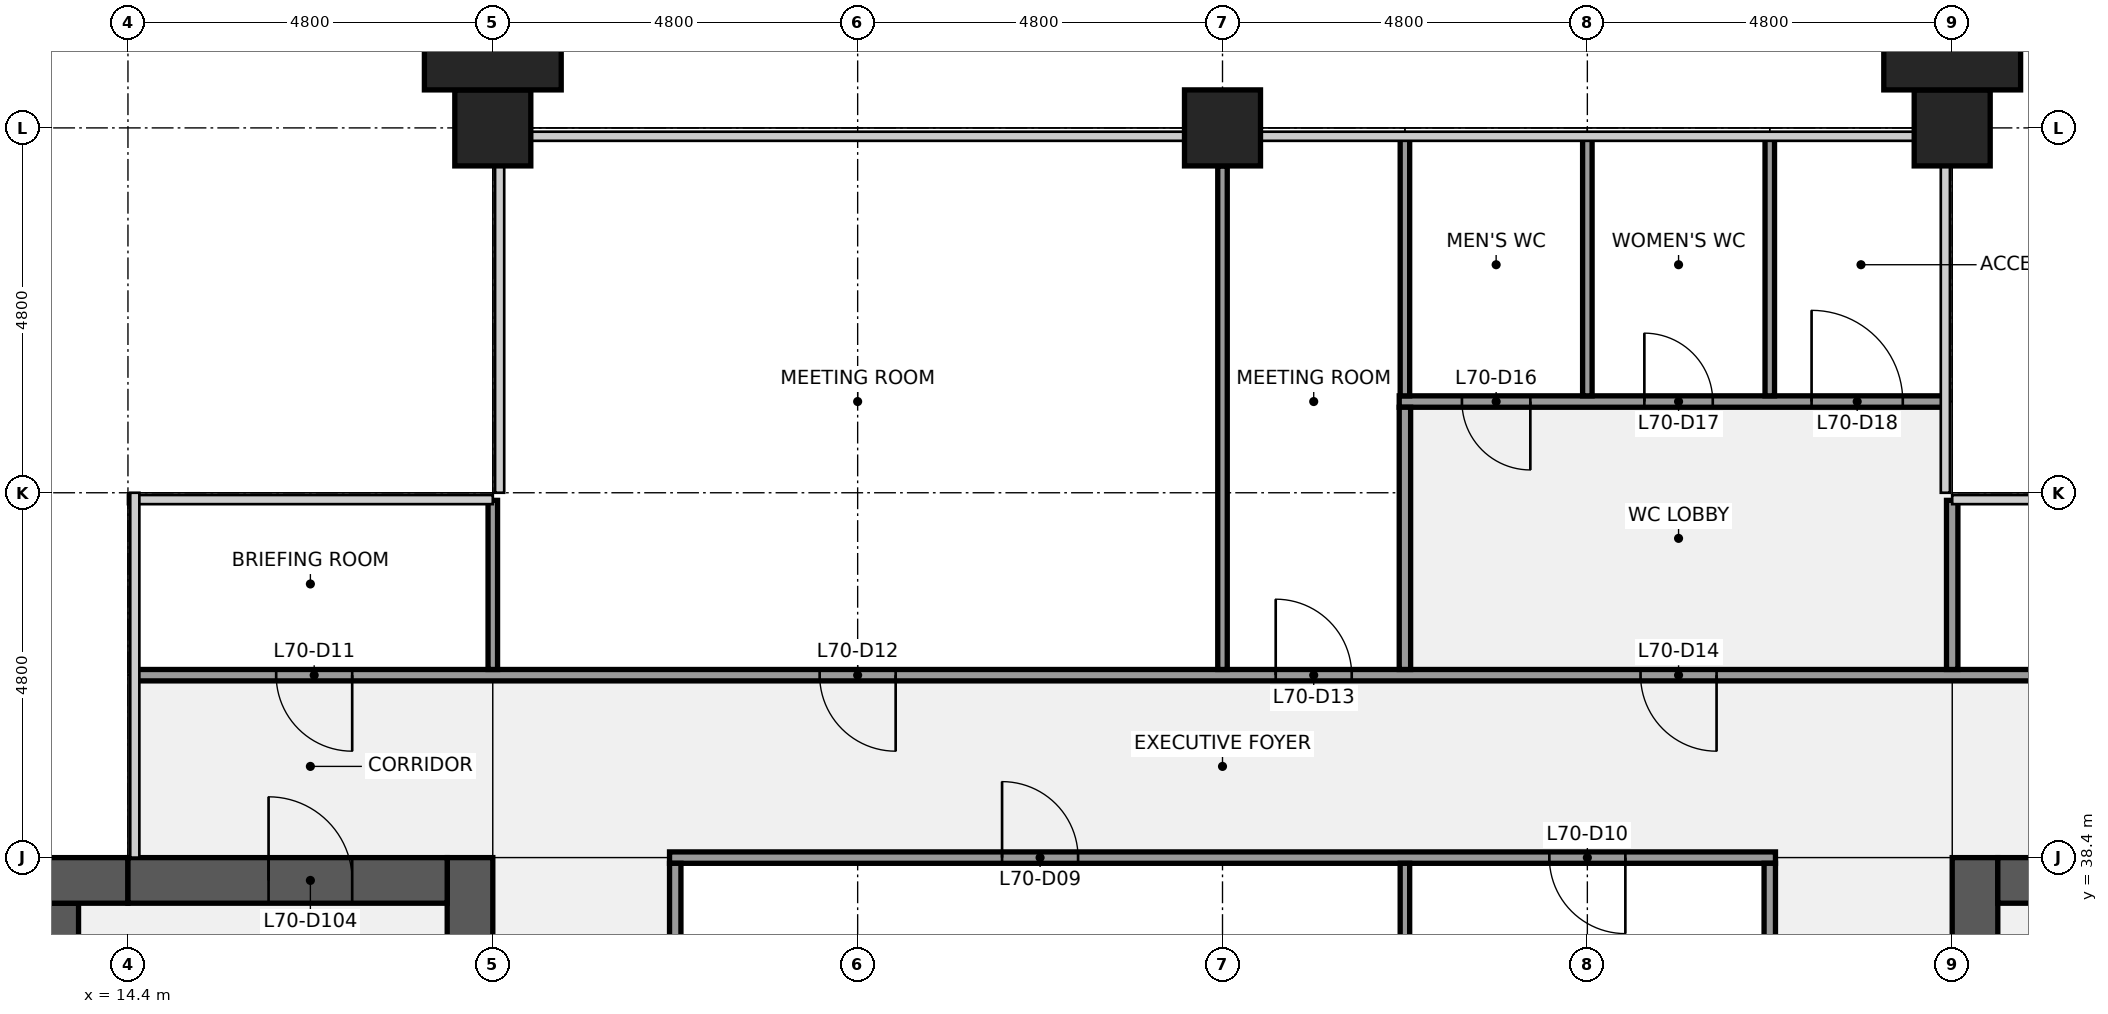
"""IFC4 building model, lengths in metres.
Left out: names, types, materials, properties, quantities, classifications, styles, units other than length and angle.
Written with IfcOpenShell. Run it as: python <this file> out.ifc"""

import sys

from ifc_helpers import new_model, si_unit, direction, frame, frame_2d, origin, origin_2d, place, context, subcontext, project, spatial, rectangle, extrude, element, fill, save


model = new_model("IFC4")
c1 = context("Model", 3, precision=1e-05, world=origin(), true_north=direction((0.0, 1.0)))
c2 = subcontext(c1, "Body", "Model", "MODEL_VIEW")
j1 = project(units=[si_unit("LENGTHUNIT", "METRE"), si_unit("PLANEANGLEUNIT", "RADIAN")], contexts=[c1])
p1 = place(None, origin())
s1 = spatial("IfcSite", under=j1, at=p1, CompositionType="ELEMENT")
p2 = place(p1, origin())
s2 = spatial("IfcBuilding", under=s1, at=p2, CompositionType="ELEMENT")
p3 = place(p2, frame((0.0, 0.0, 318.3)))
s3 = spatial("IfcBuildingStorey", under=s2, at=p3, CompositionType="ELEMENT", Elevation=318.3)
for number, where, z_axis, x_axis in (
    (1, (19.2, 48.0, 0.0), (0.0, 0.0, 1.0), (1.0, 0.0, 0.0)),
    (2, (28.8, 48.0, 0.0), (0.0, 0.0, 1.0), (1.0, 0.0, 0.0)),
    (3, (38.4, 48.0, 0.0), (0.0, 0.0, 1.0), (1.0, 0.0, 0.0)),
):
    element("IfcColumn", number, at=place(p3, frame(where, z_axis=z_axis, x_axis=x_axis)), inside=s3, PredefinedType="COLUMN", context=c2, shape_type="SweptSolid", body=[
        extrude(rectangle(XDim=1.0, YDim=1.0, at=origin_2d()), origin(), (0.0, 0.0, 1.0), 4.0),
    ])
p4 = place(p3, frame((18.9, 38.4, 0.0), z_axis=(0.0, 0.0, 1.0), x_axis=(0.0, -1.0, 0.0)))
e4 = element("IfcWall", 4, at=p4, inside=s3, PredefinedType="SHEAR", context=c2, shape_type="SweptSolid", body=[
    extrude(rectangle(XDim=28.8, YDim=0.6, at=frame_2d((14.4, 0.0))), origin(), (0.0, 0.0, 1.0), 3.84),
])
p5 = place(p4, frame((18.3, 0.0, 0.0)))
e5 = element("IfcOpeningElement", 5, at=p5, cuts=e4, PredefinedType="OPENING", context=c2, shape_type="SweptSolid", body=[
    extrude(rectangle(XDim=1.8, YDim=2.1, at=frame_2d((0.9, 1.05))), frame((0.0, 0.31, 0.0), z_axis=(0.0, -1.0, 0.0), x_axis=(1.0, 0.0, 0.0)), (0.0, 0.0, 1.0), 0.62),
])
p6 = place(p4, frame((8.7, 0.0, 0.0)))
e6 = element("IfcOpeningElement", 6, at=p6, cuts=e4, PredefinedType="OPENING", context=c2, shape_type="SweptSolid", body=[
    extrude(rectangle(XDim=1.8, YDim=2.1, at=frame_2d((0.9, 1.05))), frame((0.0, 0.31, 0.0), z_axis=(0.0, -1.0, 0.0), x_axis=(1.0, 0.0, 0.0)), (0.0, 0.0, 1.0), 0.62),
])
p7 = place(p3, frame((6.25, 37.5, 0.0), z_axis=(0.0, 0.0, 1.0), x_axis=(1.0, 0.0, 0.0)))
e7 = element("IfcWall", 7, at=p7, inside=s3, PredefinedType="SHEAR", context=c2, shape_type="SweptSolid", body=[
    extrude(rectangle(XDim=7.5, YDim=0.6, at=frame_2d((3.75, 0.0))), origin(), (0.0, 0.0, 1.0), 3.84),
])
p8 = place(p3, frame((0.6, 38.1, 0.0), z_axis=(0.0, 0.0, 1.0), x_axis=(1.0, 0.0, 0.0)))
e8 = element("IfcWall", 8, at=p8, inside=s3, PredefinedType="SHEAR", context=c2, shape_type="SweptSolid", body=[
    extrude(rectangle(XDim=13.8, YDim=0.6, at=frame_2d((6.9, 0.0))), origin(), (0.0, 0.0, 1.0), 3.84),
])
p9 = place(p8, frame((5.7, 0.0, 0.9)))
e9 = element("IfcOpeningElement", 9, at=p9, cuts=e8, PredefinedType="OPENING", context=c2, shape_type="SweptSolid", body=[
    extrude(rectangle(XDim=1.8, YDim=1.5, at=frame_2d((0.9, 0.75))), frame((0.0, 0.31, 0.0), z_axis=(0.0, -1.0, 0.0), x_axis=(1.0, 0.0, 0.0)), (0.0, 0.0, 1.0), 0.62),
])
p10 = place(p8, frame((10.5, 0.0, 0.9)))
e10 = element("IfcOpeningElement", 10, at=p10, cuts=e8, PredefinedType="OPENING", context=c2, shape_type="SweptSolid", body=[
    extrude(rectangle(XDim=1.8, YDim=1.5, at=frame_2d((0.9, 0.75))), frame((0.0, 0.31, 0.0), z_axis=(0.0, -1.0, 0.0), x_axis=(1.0, 0.0, 0.0)), (0.0, 0.0, 1.0), 0.62),
])
p11 = place(p3, frame((14.4, 38.1, 0.0), z_axis=(0.0, 0.0, 1.0), x_axis=(1.0, 0.0, 0.0)))
e11 = element("IfcWall", 11, at=p11, inside=s3, PredefinedType="SHEAR", context=c2, shape_type="SweptSolid", body=[
    extrude(rectangle(XDim=4.2, YDim=0.6, at=frame_2d((2.1, 0.0))), origin(), (0.0, 0.0, 1.0), 3.84),
])
p12 = place(p11, frame((1.85, 0.0, 0.0)))
e12 = element("IfcOpeningElement", 12, at=p12, cuts=e11, PredefinedType="OPENING", context=c2, shape_type="SweptSolid", body=[
    extrude(rectangle(XDim=1.1, YDim=2.1, at=frame_2d((0.55, 1.05))), frame((0.0, 0.31, 0.0), z_axis=(0.0, -1.0, 0.0), x_axis=(1.0, 0.0, 0.0)), (0.0, 0.0, 1.0), 0.62),
])
p13 = place(p3, frame((38.7, 9.6, 0.0), z_axis=(0.0, 0.0, 1.0), x_axis=(0.0, 1.0, 0.0)))
e13 = element("IfcWall", 13, at=p13, inside=s3, PredefinedType="SHEAR", context=c2, shape_type="SweptSolid", body=[
    extrude(rectangle(XDim=28.8, YDim=0.6, at=frame_2d((14.4, 0.0))), origin(), (0.0, 0.0, 1.0), 3.84),
])
p14 = place(p13, frame((8.7, 0.0, 0.0)))
e14 = element("IfcOpeningElement", 14, at=p14, cuts=e13, PredefinedType="OPENING", context=c2, shape_type="SweptSolid", body=[
    extrude(rectangle(XDim=1.8, YDim=2.1, at=frame_2d((0.9, 1.05))), frame((0.0, 0.31, 0.0), z_axis=(0.0, -1.0, 0.0), x_axis=(1.0, 0.0, 0.0)), (0.0, 0.0, 1.0), 0.62),
])
p15 = place(p13, frame((18.3, 0.0, 0.0)))
e15 = element("IfcOpeningElement", 15, at=p15, cuts=e13, PredefinedType="OPENING", context=c2, shape_type="SweptSolid", body=[
    extrude(rectangle(XDim=1.8, YDim=2.1, at=frame_2d((0.9, 1.05))), frame((0.0, 0.31, 0.0), z_axis=(0.0, -1.0, 0.0), x_axis=(1.0, 0.0, 0.0)), (0.0, 0.0, 1.0), 0.62),
])
p16 = place(p3, frame((39.0, 38.1, 0.0), z_axis=(0.0, 0.0, 1.0), x_axis=(1.0, 0.0, 0.0)))
e16 = element("IfcWall", 16, at=p16, inside=s3, PredefinedType="SHEAR", context=c2, shape_type="SweptSolid", body=[
    extrude(rectangle(XDim=4.2, YDim=0.6, at=frame_2d((2.1, 0.0))), origin(), (0.0, 0.0, 1.0), 3.84),
])
p17 = place(p16, frame((1.25, 0.0, 0.0)))
e17 = element("IfcOpeningElement", 17, at=p17, cuts=e16, PredefinedType="OPENING", context=c2, shape_type="SweptSolid", body=[
    extrude(rectangle(XDim=1.1, YDim=2.1, at=frame_2d((0.55, 1.05))), frame((0.0, 0.31, 0.0), z_axis=(0.0, -1.0, 0.0), x_axis=(1.0, 0.0, 0.0)), (0.0, 0.0, 1.0), 0.62),
])
p18 = place(p3, frame((21.525, 38.4, 0.0), z_axis=(0.0, 0.0, 1.0), x_axis=(1.0, 0.0, 0.0)))
e18 = element("IfcWall", 18, at=p18, inside=s3, PredefinedType="PARTITIONING", context=c2, shape_type="SweptSolid", body=[
    extrude(rectangle(XDim=14.55, YDim=0.15, at=frame_2d((7.275, 0.0))), origin(), (0.0, 0.0, 1.0), 2.87),
])
p19 = place(p18, frame((4.375, 0.0, 0.0)))
e19 = element("IfcOpeningElement", 19, at=p19, cuts=e18, PredefinedType="OPENING", context=c2, shape_type="SweptSolid", body=[
    extrude(rectangle(XDim=1.0, YDim=2.1, at=frame_2d((0.5, 1.05))), frame((0.0, 0.085, 0.0), z_axis=(0.0, -1.0, 0.0), x_axis=(1.0, 0.0, 0.0)), (0.0, 0.0, 1.0), 0.17),
])
p20 = place(p18, frame((11.575, 0.0, 0.0)))
e20 = element("IfcOpeningElement", 20, at=p20, cuts=e18, PredefinedType="OPENING", context=c2, shape_type="SweptSolid", body=[
    extrude(rectangle(XDim=1.0, YDim=2.1, at=frame_2d((0.5, 1.05))), frame((0.0, 0.085, 0.0), z_axis=(0.0, -1.0, 0.0), x_axis=(1.0, 0.0, 0.0)), (0.0, 0.0, 1.0), 0.17),
])
p21 = place(p3, frame((14.5, 40.8, 0.0), z_axis=(0.0, 0.0, 1.0), x_axis=(1.0, 0.0, 0.0)))
e21 = element("IfcWall", 21, at=p21, inside=s3, PredefinedType="PARTITIONING", context=c2, shape_type="SweptSolid", body=[
    extrude(rectangle(XDim=28.6, YDim=0.15, at=frame_2d((14.3, 0.0))), origin(), (0.0, 0.0, 1.0), 2.87),
])
p22 = place(p21, frame((1.85, 0.0, 0.0)))
e22 = element("IfcOpeningElement", 22, at=p22, cuts=e21, PredefinedType="OPENING", context=c2, shape_type="SweptSolid", body=[
    extrude(rectangle(XDim=1.0, YDim=2.1, at=frame_2d((0.5, 1.05))), frame((0.0, 0.085, 0.0), z_axis=(0.0, -1.0, 0.0), x_axis=(1.0, 0.0, 0.0)), (0.0, 0.0, 1.0), 0.17),
])
p23 = place(p21, frame((9.0, 0.0, 0.0)))
e23 = element("IfcOpeningElement", 23, at=p23, cuts=e21, PredefinedType="OPENING", context=c2, shape_type="SweptSolid", body=[
    extrude(rectangle(XDim=1.0, YDim=2.1, at=frame_2d((0.5, 1.05))), frame((0.0, 0.085, 0.0), z_axis=(0.0, -1.0, 0.0), x_axis=(1.0, 0.0, 0.0)), (0.0, 0.0, 1.0), 0.17),
])
p24 = place(p21, frame((15.0, 0.0, 0.0)))
e24 = element("IfcOpeningElement", 24, at=p24, cuts=e21, PredefinedType="OPENING", context=c2, shape_type="SweptSolid", body=[
    extrude(rectangle(XDim=1.0, YDim=2.1, at=frame_2d((0.5, 1.05))), frame((0.0, 0.085, 0.0), z_axis=(0.0, -1.0, 0.0), x_axis=(1.0, 0.0, 0.0)), (0.0, 0.0, 1.0), 0.17),
])
p25 = place(p21, frame((19.8, 0.0, 0.0)))
e25 = element("IfcOpeningElement", 25, at=p25, cuts=e21, PredefinedType="OPENING", context=c2, shape_type="SweptSolid", body=[
    extrude(rectangle(XDim=1.0, YDim=2.1, at=frame_2d((0.5, 1.05))), frame((0.0, 0.085, 0.0), z_axis=(0.0, -1.0, 0.0), x_axis=(1.0, 0.0, 0.0)), (0.0, 0.0, 1.0), 0.17),
])
p26 = place(p21, frame((25.75, 0.0, 0.0)))
e26 = element("IfcOpeningElement", 26, at=p26, cuts=e21, PredefinedType="OPENING", context=c2, shape_type="SweptSolid", body=[
    extrude(rectangle(XDim=1.0, YDim=2.1, at=frame_2d((0.5, 1.05))), frame((0.0, 0.085, 0.0), z_axis=(0.0, -1.0, 0.0), x_axis=(1.0, 0.0, 0.0)), (0.0, 0.0, 1.0), 0.17),
])
p27 = place(p3, frame((31.125, 44.4, 0.0), z_axis=(0.0, 0.0, 1.0), x_axis=(1.0, 0.0, 0.0)))
e27 = element("IfcWall", 27, at=p27, inside=s3, PredefinedType="PARTITIONING", context=c2, shape_type="SweptSolid", body=[
    extrude(rectangle(XDim=7.175, YDim=0.15, at=frame_2d((3.587, 0.0))), origin(), (0.0, 0.0, 1.0), 2.87),
])
p28 = place(p27, frame((0.825, 0.0, 0.0)))
e28 = element("IfcOpeningElement", 28, at=p28, cuts=e27, PredefinedType="OPENING", context=c2, shape_type="SweptSolid", body=[
    extrude(rectangle(XDim=0.9, YDim=2.1, at=frame_2d((0.45, 1.05))), frame((0.0, 0.085, 0.0), z_axis=(0.0, -1.0, 0.0), x_axis=(1.0, 0.0, 0.0)), (0.0, 0.0, 1.0), 0.17),
])
p29 = place(p27, frame((3.225, 0.0, 0.0)))
e29 = element("IfcOpeningElement", 29, at=p29, cuts=e27, PredefinedType="OPENING", context=c2, shape_type="SweptSolid", body=[
    extrude(rectangle(XDim=0.9, YDim=2.1, at=frame_2d((0.45, 1.05))), frame((0.0, 0.085, 0.0), z_axis=(0.0, -1.0, 0.0), x_axis=(1.0, 0.0, 0.0)), (0.0, 0.0, 1.0), 0.17),
])
p30 = place(p27, frame((5.425, 0.0, 0.0)))
e30 = element("IfcOpeningElement", 30, at=p30, cuts=e27, PredefinedType="OPENING", context=c2, shape_type="SweptSolid", body=[
    extrude(rectangle(XDim=1.2, YDim=2.1, at=frame_2d((0.6, 1.05))), frame((0.0, 0.085, 0.0), z_axis=(0.0, -1.0, 0.0), x_axis=(1.0, 0.0, 0.0)), (0.0, 0.0, 1.0), 0.17),
])
p31 = place(p3, frame((19.2, 40.875, 0.0), z_axis=(0.0, 0.0, 1.0), x_axis=(0.0, 1.0, 0.0)))
e31 = element("IfcWall", 31, at=p31, inside=s3, PredefinedType="PARTITIONING", context=c2, shape_type="SweptSolid", body=[
    extrude(rectangle(XDim=2.225, YDim=0.125, at=frame_2d((1.113, 0.0))), origin(), (0.0, 0.0, 1.0), 2.87),
])
p32 = place(p3, frame((21.6, 33.675, 0.0), z_axis=(0.0, 0.0, 1.0), x_axis=(0.0, 1.0, 0.0)))
e32 = element("IfcWall", 32, at=p32, inside=s3, PredefinedType="PARTITIONING", context=c2, shape_type="SweptSolid", body=[
    extrude(rectangle(XDim=4.65, YDim=0.15, at=frame_2d((2.325, 0.0))), origin(), (0.0, 0.0, 1.0), 2.87),
])
p33 = place(p3, frame((28.8, 40.875, 0.0), z_axis=(0.0, 0.0, 1.0), x_axis=(0.0, 1.0, 0.0)))
e33 = element("IfcWall", 33, at=p33, inside=s3, PredefinedType="PARTITIONING", context=c2, shape_type="SweptSolid", body=[
    extrude(rectangle(XDim=6.625, YDim=0.125, at=frame_2d((3.312, 0.0))), origin(), (0.0, 0.0, 1.0), 2.87),
])
p34 = place(p3, frame((31.2, 33.663, 0.0), z_axis=(0.0, 0.0, 1.0), x_axis=(0.0, 1.0, 0.0)))
e34 = element("IfcWall", 34, at=p34, inside=s3, PredefinedType="PARTITIONING", context=c2, shape_type="SweptSolid", body=[
    extrude(rectangle(XDim=4.662, YDim=0.125, at=frame_2d((2.331, 0.0))), origin(), (0.0, 0.0, 1.0), 2.87),
])
p35 = place(p3, frame((31.2, 44.475, 0.0), z_axis=(0.0, 0.0, 1.0), x_axis=(0.0, 1.0, 0.0)))
e35 = element("IfcWall", 35, at=p35, inside=s3, PredefinedType="PARTITIONING", context=c2, shape_type="SweptSolid", body=[
    extrude(rectangle(XDim=3.425, YDim=0.125, at=frame_2d((1.712, 0.0))), origin(), (0.0, 0.0, 1.0), 2.87),
])
p36 = place(p3, frame((31.2, 40.875, 0.0), z_axis=(0.0, 0.0, 1.0), x_axis=(0.0, 1.0, 0.0)))
e36 = element("IfcWall", 36, at=p36, inside=s3, PredefinedType="PARTITIONING", context=c2, shape_type="SweptSolid", body=[
    extrude(rectangle(XDim=3.45, YDim=0.15, at=frame_2d((1.725, 0.0))), origin(), (0.0, 0.0, 1.0), 2.87),
])
for number, where, z_axis, x_axis in (
    (37, (33.6, 44.475, 0.0), (0.0, 0.0, 1.0), (0.0, 1.0, 0.0)),
    (38, (36.0, 44.475, 0.0), (0.0, 0.0, 1.0), (0.0, 1.0, 0.0)),
):
    element("IfcWall", number, at=place(p3, frame(where, z_axis=z_axis, x_axis=x_axis)), inside=s3, PredefinedType="PARTITIONING", context=c2, shape_type="SweptSolid", body=[
        extrude(rectangle(XDim=3.425, YDim=0.125, at=frame_2d((1.712, 0.0))), origin(), (0.0, 0.0, 1.0), 2.87),
    ])
p37 = place(p3, frame((36.0, 33.675, 0.0), z_axis=(0.0, 0.0, 1.0), x_axis=(0.0, 1.0, 0.0)))
e39 = element("IfcWall", 39, at=p37, inside=s3, PredefinedType="PARTITIONING", context=c2, shape_type="SweptSolid", body=[
    extrude(rectangle(XDim=4.65, YDim=0.15, at=frame_2d((2.325, 0.0))), origin(), (0.0, 0.0, 1.0), 2.87),
])
p38 = place(p3, frame((38.4, 40.875, 0.0), z_axis=(0.0, 0.0, 1.0), x_axis=(0.0, 1.0, 0.0)))
e40 = element("IfcWall", 40, at=p38, inside=s3, PredefinedType="PARTITIONING", context=c2, shape_type="SweptSolid", body=[
    extrude(rectangle(XDim=2.225, YDim=0.15, at=frame_2d((1.113, 0.0))), origin(), (0.0, 0.0, 1.0), 2.87),
])
for number, where, z_axis, x_axis in (
    (41, (19.2, 49.0, 0.0), (0.0, 0.0, 1.0), (1.0, 0.0, 0.0)),
    (42, (38.4, 49.0, 0.0), (0.0, 0.0, 1.0), (1.0, 0.0, 0.0)),
):
    element("IfcColumn", number, at=place(p3, frame(where, z_axis=z_axis, x_axis=x_axis)), inside=s3, PredefinedType="PILASTER", context=c2, shape_type="SweptSolid", body=[
        extrude(rectangle(XDim=1.8, YDim=1.0, at=origin_2d()), origin(), (0.0, 0.0, 1.0), 4.0),
    ])
p39 = place(p12, origin())
e43 = element("IfcDoor", 43, at=p39, inside=s3, OperationType="SINGLE_SWING_LEFT", PredefinedType="DOOR", context=c2, shape_type="SweptSolid", body=[
    extrude(rectangle(XDim=1.1, YDim=2.1, at=frame_2d((0.55, 1.05))), frame((0.0, 0.025, 0.0), z_axis=(0.0, -1.0, 0.0), x_axis=(1.0, 0.0, 0.0)), (0.0, 0.0, 1.0), 0.05),
])
fill(e12, e43)
p40 = place(p19, origin())
e44 = element("IfcDoor", 44, at=p40, inside=s3, OperationType="SINGLE_SWING_LEFT", PredefinedType="DOOR", context=c2, shape_type="SweptSolid", body=[
    extrude(rectangle(XDim=1.0, YDim=2.1, at=frame_2d((0.5, 1.05))), frame((0.0, 0.025, 0.0), z_axis=(0.0, -1.0, 0.0), x_axis=(1.0, 0.0, 0.0)), (0.0, 0.0, 1.0), 0.05),
])
fill(e19, e44)
p41 = place(p20, origin())
e45 = element("IfcDoor", 45, at=p41, inside=s3, OperationType="SINGLE_SWING_RIGHT", PredefinedType="DOOR", context=c2, shape_type="SweptSolid", body=[
    extrude(rectangle(XDim=1.0, YDim=2.1, at=frame_2d((0.5, 1.05))), frame((0.0, 0.025, 0.0), z_axis=(0.0, -1.0, 0.0), x_axis=(1.0, 0.0, 0.0)), (0.0, 0.0, 1.0), 0.05),
])
fill(e20, e45)
p42 = place(p22, origin())
e46 = element("IfcDoor", 46, at=p42, inside=s3, OperationType="SINGLE_SWING_RIGHT", PredefinedType="DOOR", context=c2, shape_type="SweptSolid", body=[
    extrude(rectangle(XDim=1.0, YDim=2.1, at=frame_2d((0.5, 1.05))), frame((0.0, 0.025, 0.0), z_axis=(0.0, -1.0, 0.0), x_axis=(1.0, 0.0, 0.0)), (0.0, 0.0, 1.0), 0.05),
])
fill(e22, e46)
p43 = place(p23, origin())
e47 = element("IfcDoor", 47, at=p43, inside=s3, OperationType="SINGLE_SWING_RIGHT", PredefinedType="DOOR", context=c2, shape_type="SweptSolid", body=[
    extrude(rectangle(XDim=1.0, YDim=2.1, at=frame_2d((0.5, 1.05))), frame((0.0, 0.025, 0.0), z_axis=(0.0, -1.0, 0.0), x_axis=(1.0, 0.0, 0.0)), (0.0, 0.0, 1.0), 0.05),
])
fill(e23, e47)
p44 = place(p24, origin())
e48 = element("IfcDoor", 48, at=p44, inside=s3, OperationType="SINGLE_SWING_LEFT", PredefinedType="DOOR", context=c2, shape_type="SweptSolid", body=[
    extrude(rectangle(XDim=1.0, YDim=2.1, at=frame_2d((0.5, 1.05))), frame((0.0, 0.025, 0.0), z_axis=(0.0, -1.0, 0.0), x_axis=(1.0, 0.0, 0.0)), (0.0, 0.0, 1.0), 0.05),
])
fill(e24, e48)
p45 = place(p25, origin())
e49 = element("IfcDoor", 49, at=p45, inside=s3, OperationType="SINGLE_SWING_RIGHT", PredefinedType="DOOR", context=c2, shape_type="SweptSolid", body=[
    extrude(rectangle(XDim=1.0, YDim=2.1, at=frame_2d((0.5, 1.05))), frame((0.0, 0.025, 0.0), z_axis=(0.0, -1.0, 0.0), x_axis=(1.0, 0.0, 0.0)), (0.0, 0.0, 1.0), 0.05),
])
fill(e25, e49)
p46 = place(p28, origin())
e50 = element("IfcDoor", 50, at=p46, inside=s3, OperationType="SINGLE_SWING_RIGHT", PredefinedType="DOOR", context=c2, shape_type="SweptSolid", body=[
    extrude(rectangle(XDim=0.9, YDim=2.1, at=frame_2d((0.45, 1.05))), frame((0.0, 0.025, 0.0), z_axis=(0.0, -1.0, 0.0), x_axis=(1.0, 0.0, 0.0)), (0.0, 0.0, 1.0), 0.05),
])
fill(e28, e50)
p47 = place(p29, origin())
e51 = element("IfcDoor", 51, at=p47, inside=s3, OperationType="SINGLE_SWING_LEFT", PredefinedType="DOOR", context=c2, shape_type="SweptSolid", body=[
    extrude(rectangle(XDim=0.9, YDim=2.1, at=frame_2d((0.45, 1.05))), frame((0.0, 0.025, 0.0), z_axis=(0.0, -1.0, 0.0), x_axis=(1.0, 0.0, 0.0)), (0.0, 0.0, 1.0), 0.05),
])
fill(e29, e51)
p48 = place(p30, origin())
e52 = element("IfcDoor", 52, at=p48, inside=s3, OperationType="SINGLE_SWING_LEFT", PredefinedType="DOOR", context=c2, shape_type="SweptSolid", body=[
    extrude(rectangle(XDim=1.2, YDim=2.1, at=frame_2d((0.6, 1.05))), frame((0.0, 0.025, 0.0), z_axis=(0.0, -1.0, 0.0), x_axis=(1.0, 0.0, 0.0)), (0.0, 0.0, 1.0), 0.05),
])
fill(e30, e52)
save(model, sys.argv[1])
